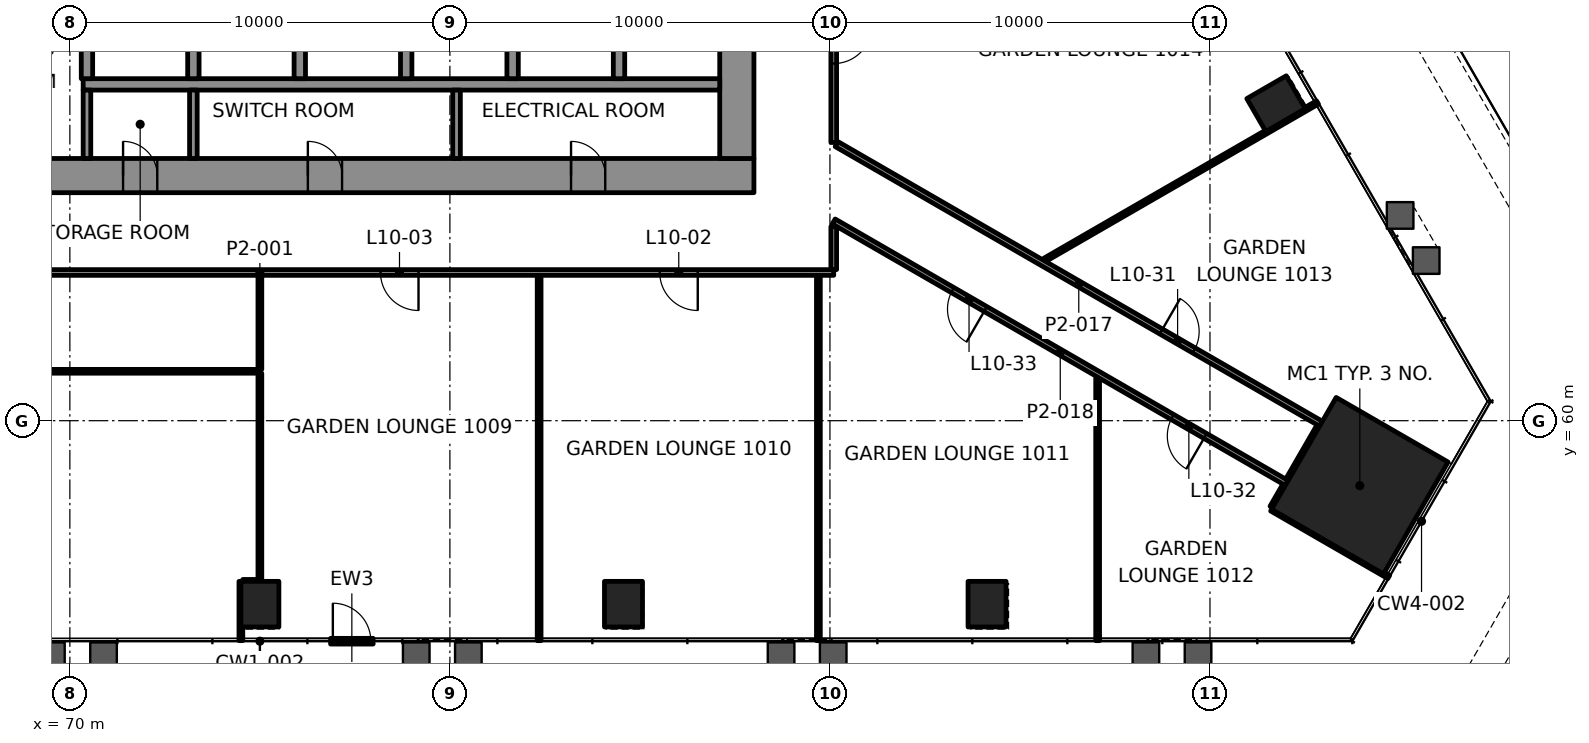
"""IFC4 building model, lengths in metres.
Left out: names, types, materials, properties, quantities, classifications, styles, units other than length and angle.
Written with IfcOpenShell. Run it as: python <this file> out.ifc"""

import sys

from ifc_helpers import new_model, si_unit, direction, frame, frame_2d, origin, origin_2d, place, context, subcontext, project, spatial, rectangle, extrude, element, fill, save


model = new_model("IFC4")
c1 = context("Model", 3, precision=1e-05, world=origin(), true_north=direction((0.0, 1.0)))
c2 = subcontext(c1, "Body", "Model", "MODEL_VIEW")
j1 = project(units=[si_unit("LENGTHUNIT", "METRE"), si_unit("PLANEANGLEUNIT", "RADIAN")], contexts=[c1])
p1 = place(None, origin())
s1 = spatial("IfcSite", under=j1, at=p1, CompositionType="ELEMENT")
p2 = place(p1, origin())
s2 = spatial("IfcBuilding", under=s1, at=p2, CompositionType="ELEMENT")
p3 = place(p2, frame((0.0, 0.0, 48.4)))
s3 = spatial("IfcBuildingStorey", under=s2, at=p3, CompositionType="ELEMENT", Elevation=48.4)
p4 = place(p3, frame((103.943, 58.29, 0.0), z_axis=(0.0, 0.0, 1.0), x_axis=(0.5, 0.866025403784, 0.0)))
e1 = element("IfcColumn", 1, at=p4, inside=s3, PredefinedType="COLUMN", context=c2, shape_type="SweptSolid", body=[
    extrude(rectangle(XDim=3.4, YDim=3.4, at=origin_2d()), origin(), (0.0, 0.0, 1.0), 4.2),
])
for number, where, z_axis, x_axis in (
    (2, (75.0, 55.172, -0.0), (0.0, 0.0, 1.0), (1.0, 0.0, 0.0)),
    (3, (84.567, 55.172, -0.0), (0.0, 0.0, 1.0), (1.0, 0.0, 0.0)),
    (4, (94.135, 55.172, -0.0), (0.0, 0.0, 1.0), (1.0, 0.0, 0.0)),
    (5, (101.739, 68.343, -0.0), (0.0, 0.0, 1.0), (-0.5, 0.866, 0.0)),
):
    element("IfcColumn", number, at=place(p3, frame(where, z_axis=z_axis, x_axis=x_axis)), inside=s3, PredefinedType="COLUMN", context=c2, shape_type="SweptSolid", body=[
        extrude(rectangle(XDim=1.0, YDim=1.2, at=origin_2d()), origin(), (0.0, 0.0, 1.0), 4.2),
    ])
p5 = place(p3, frame((62.0, 66.45, 0.0), z_axis=(0.0, 0.0, 1.0), x_axis=(1.0, 0.0, 0.0)))
e6 = element("IfcWall", 6, at=p5, inside=s3, PredefinedType="SHEAR", context=c2, shape_type="SweptSolid", body=[
    extrude(rectangle(XDim=26.0, YDim=0.9, at=frame_2d((13.0, 0.0))), origin(), (0.0, 0.0, 1.0), 4.0),
])
p6 = place(p5, frame((3.45, 0.0, 0.0)))
e7 = element("IfcOpeningElement", 7, at=p6, cuts=e6, PredefinedType="OPENING", context=c2, shape_type="SweptSolid", body=[
    extrude(rectangle(XDim=0.9, YDim=2.1, at=frame_2d((0.45, 1.05))), frame((0.0, 0.46, 0.0), z_axis=(0.0, -1.0, 0.0), x_axis=(1.0, 0.0, 0.0)), (0.0, 0.0, 1.0), 0.92),
])
p7 = place(p5, frame((6.425, 0.0, 0.0)))
e8 = element("IfcOpeningElement", 8, at=p7, cuts=e6, PredefinedType="OPENING", context=c2, shape_type="SweptSolid", body=[
    extrude(rectangle(XDim=0.9, YDim=2.1, at=frame_2d((0.45, 1.05))), frame((0.0, 0.46, 0.0), z_axis=(0.0, -1.0, 0.0), x_axis=(1.0, 0.0, 0.0)), (0.0, 0.0, 1.0), 0.92),
])
p8 = place(p5, frame((9.4, 0.0, 0.0)))
e9 = element("IfcOpeningElement", 9, at=p8, cuts=e6, PredefinedType="OPENING", context=c2, shape_type="SweptSolid", body=[
    extrude(rectangle(XDim=0.9, YDim=2.1, at=frame_2d((0.45, 1.05))), frame((0.0, 0.46, 0.0), z_axis=(0.0, -1.0, 0.0), x_axis=(1.0, 0.0, 0.0)), (0.0, 0.0, 1.0), 0.92),
])
p9 = place(p5, frame((14.262, 0.0, 0.0)))
e10 = element("IfcOpeningElement", 10, at=p9, cuts=e6, PredefinedType="OPENING", context=c2, shape_type="SweptSolid", body=[
    extrude(rectangle(XDim=0.9, YDim=2.1, at=frame_2d((0.45, 1.05))), frame((0.0, 0.46, 0.0), z_axis=(0.0, -1.0, 0.0), x_axis=(1.0, 0.0, 0.0)), (0.0, 0.0, 1.0), 0.92),
])
p10 = place(p5, frame((21.188, 0.0, 0.0)))
e11 = element("IfcOpeningElement", 11, at=p10, cuts=e6, PredefinedType="OPENING", context=c2, shape_type="SweptSolid", body=[
    extrude(rectangle(XDim=0.9, YDim=2.1, at=frame_2d((0.45, 1.05))), frame((0.0, 0.46, 0.0), z_axis=(0.0, -1.0, 0.0), x_axis=(1.0, 0.0, 0.0)), (0.0, 0.0, 1.0), 0.92),
])
p11 = place(p3, frame((87.55, 66.9, 0.0), z_axis=(0.0, 0.0, 1.0), x_axis=(0.0, 1.0, 0.0)))
e12 = element("IfcWall", 12, at=p11, inside=s3, PredefinedType="SHEAR", context=c2, shape_type="SweptSolid", body=[
    extrude(rectangle(XDim=16.2, YDim=0.9, at=frame_2d((8.1, 0.0))), origin(), (0.0, 0.0, 1.0), 4.0),
])
p12 = place(p11, frame((5.5, 0.0, 0.0)))
e13 = element("IfcOpeningElement", 13, at=p12, cuts=e12, PredefinedType="OPENING", context=c2, shape_type="SweptSolid", body=[
    extrude(rectangle(XDim=1.8, YDim=2.1, at=frame_2d((0.9, 1.05))), frame((0.0, 0.46, 0.0), z_axis=(0.0, -1.0, 0.0), x_axis=(1.0, 0.0, 0.0)), (0.0, 0.0, 1.0), 0.92),
])
p13 = place(p11, frame((11.738, 0.0, 0.0)))
e14 = element("IfcOpeningElement", 14, at=p13, cuts=e12, PredefinedType="OPENING", context=c2, shape_type="SweptSolid", body=[
    extrude(rectangle(XDim=0.9, YDim=2.1, at=frame_2d((0.45, 1.05))), frame((0.0, 0.46, 0.0), z_axis=(0.0, -1.0, 0.0), x_axis=(1.0, 0.0, 0.0)), (0.0, 0.0, 1.0), 0.92),
])
p14 = place(p3, frame((70.35, 68.85, 0.0), z_axis=(0.0, 0.0, 1.0), x_axis=(1.0, 0.0, 0.0)))
e15 = element("IfcWall", 15, at=p14, inside=s3, PredefinedType="SHEAR", context=c2, shape_type="SweptSolid", body=[
    extrude(rectangle(XDim=16.75, YDim=0.3, at=frame_2d((8.375, 0.0))), origin(), (0.0, 0.0, 1.0), 4.0),
])
for number, where, z_axis, x_axis in (
    (16, (70.45, 69.0, 0.0), (0.0, 0.0, 1.0), (0.0, 1.0, 0.0)),
    (17, (73.25, 69.0, 0.0), (0.0, 0.0, 1.0), (0.0, 1.0, 0.0)),
    (18, (76.05, 69.0, 0.0), (0.0, 0.0, 1.0), (0.0, 1.0, 0.0)),
    (19, (78.85, 69.0, 0.0), (0.0, 0.0, 1.0), (0.0, 1.0, 0.0)),
    (20, (81.65, 69.0, 0.0), (0.0, 0.0, 1.0), (0.0, 1.0, 0.0)),
    (21, (84.45, 69.0, 0.0), (0.0, 0.0, 1.0), (0.0, 1.0, 0.0)),
):
    element("IfcWall", number, at=place(p3, frame(where, z_axis=z_axis, x_axis=x_axis)), inside=s3, PredefinedType="SHEAR", context=c2, shape_type="SweptSolid", body=[
        extrude(rectangle(XDim=2.6, YDim=0.3, at=frame_2d((1.3, 0.0))), origin(), (0.0, 0.0, 1.0), 4.0),
    ])
p15 = place(p3, frame((74.551, 55.772, 0.0), z_axis=(0.0, 0.0, 1.0), x_axis=(1.0, 0.0, 0.0)))
e22 = element("IfcWall", 22, at=p15, inside=s3, PredefinedType="PARTITIONING", context=c2, shape_type="SweptSolid", body=[
    extrude(rectangle(XDim=0.399, YDim=0.1, at=frame_2d((0.199, 0.0))), origin(), (0.0, 0.0, 1.0), 3.4),
])
p16 = place(p3, frame((58.271, 61.3, 0.0), z_axis=(0.0, 0.0, 1.0), x_axis=(1.0, 0.0, 0.0)))
e23 = element("IfcWall", 23, at=p16, inside=s3, PredefinedType="PARTITIONING", context=c2, shape_type="SweptSolid", body=[
    extrude(rectangle(XDim=16.729, YDim=0.1, at=frame_2d((8.365, 0.0))), origin(), (0.0, 0.0, 1.0), 3.4),
])
p17 = place(p16, frame((7.865, 0.0, 0.0)))
e24 = element("IfcOpeningElement", 24, at=p17, cuts=e23, PredefinedType="OPENING", context=c2, shape_type="SweptSolid", body=[
    extrude(rectangle(XDim=1.0, YDim=2.1, at=frame_2d((0.5, 1.05))), frame((0.0, 0.06, 0.0), z_axis=(0.0, -1.0, 0.0), x_axis=(1.0, 0.0, 0.0)), (0.0, 0.0, 1.0), 0.12),
])
p18 = place(p3, frame((90.1, 63.9, 0.0), z_axis=(0.0, 0.0, 1.0), x_axis=(-1.0, 0.0, 0.0)))
e25 = element("IfcWall", 25, at=p18, inside=s3, PredefinedType="PARTITIONING", context=c2, shape_type="SweptSolid", body=[
    extrude(rectangle(XDim=30.2, YDim=0.15, at=frame_2d((15.1, 0.0))), origin(), (0.0, 0.0, 1.0), 3.4),
])
p19 = place(p18, frame((3.578, 0.0, 0.0)))
e26 = element("IfcOpeningElement", 26, at=p19, cuts=e25, PredefinedType="OPENING", context=c2, shape_type="SweptSolid", body=[
    extrude(rectangle(XDim=1.0, YDim=2.1, at=frame_2d((0.5, 1.05))), frame((0.0, 0.085, 0.0), z_axis=(0.0, -1.0, 0.0), x_axis=(1.0, 0.0, 0.0)), (0.0, 0.0, 1.0), 0.17),
])
p20 = place(p18, frame((10.926, 0.0, 0.0)))
e27 = element("IfcOpeningElement", 27, at=p20, cuts=e25, PredefinedType="OPENING", context=c2, shape_type="SweptSolid", body=[
    extrude(rectangle(XDim=1.0, YDim=2.1, at=frame_2d((0.5, 1.05))), frame((0.0, 0.085, 0.0), z_axis=(0.0, -1.0, 0.0), x_axis=(1.0, 0.0, 0.0)), (0.0, 0.0, 1.0), 0.17),
])
p21 = place(p18, frame((22.048, 0.0, 0.0)))
e28 = element("IfcOpeningElement", 28, at=p21, cuts=e25, PredefinedType="OPENING", context=c2, shape_type="SweptSolid", body=[
    extrude(rectangle(XDim=1.0, YDim=2.1, at=frame_2d((0.5, 1.05))), frame((0.0, 0.085, 0.0), z_axis=(0.0, -1.0, 0.0), x_axis=(1.0, 0.0, 0.0)), (0.0, 0.0, 1.0), 0.17),
])
p22 = place(p3, frame((95.653, 64.232, 0.0), z_axis=(0.0, 0.0, 1.0), x_axis=(0.866031516549, 0.499989412232, 0.0)))
e29 = element("IfcWall", 29, at=p22, inside=s3, PredefinedType="PARTITIONING", context=c2, shape_type="SweptSolid", body=[
    extrude(rectangle(XDim=8.286, YDim=0.1, at=frame_2d((4.143, 0.0))), origin(), (0.0, 0.0, 1.0), 3.4),
])
p23 = place(p3, frame((101.646, 57.711, 0.0), z_axis=(0.0, 0.0, 1.0), x_axis=(0.499837337514, 0.866119296648, 0.0)))
e30 = element("IfcWall", 30, at=p23, inside=s3, PredefinedType="PARTITIONING", context=c2, shape_type="SweptSolid", body=[
    extrude(rectangle(XDim=0.675, YDim=0.15, at=frame_2d((0.337, 0.0))), origin(), (0.0, 0.0, 1.0), 3.4),
])
p24 = place(p3, frame((97.044, 54.212, 0.0), z_axis=(0.0, 0.0, 1.0), x_axis=(0.0, 1.0, 0.0)))
e31 = element("IfcWall", 31, at=p24, inside=s3, PredefinedType="PARTITIONING", context=c2, shape_type="SweptSolid", body=[
    extrude(rectangle(XDim=6.905, YDim=0.1, at=frame_2d((3.453, 0.0))), origin(), (0.0, 0.0, 1.0), 3.4),
])
p25 = place(p3, frame((90.1, 63.976, 0.0), z_axis=(0.0, 0.0, 1.0), x_axis=(0.0, 1.0, 0.0)))
e32 = element("IfcWall", 32, at=p25, inside=s3, PredefinedType="PARTITIONING", context=c2, shape_type="SweptSolid", body=[
    extrude(rectangle(XDim=1.131, YDim=0.15, at=frame_2d((0.565, 0.0))), origin(), (0.0, 0.0, 1.0), 3.247),
])
p26 = place(p3, frame((90.1, 86.1, 0.0), z_axis=(0.0, 0.0, 1.0), x_axis=(0.0, -1.0, 0.0)))
e33 = element("IfcWall", 33, at=p26, inside=s3, PredefinedType="PARTITIONING", context=c2, shape_type="SweptSolid", body=[
    extrude(rectangle(XDim=18.778, YDim=0.15, at=frame_2d((9.389, 0.0))), origin(), (0.0, 0.0, 1.0), 3.4),
])
p27 = place(p26, frame((7.704, 0.0, 0.0)))
e34 = element("IfcOpeningElement", 34, at=p27, cuts=e33, PredefinedType="OPENING", context=c2, shape_type="SweptSolid", body=[
    extrude(rectangle(XDim=1.0, YDim=2.1, at=frame_2d((0.5, 1.05))), frame((0.0, 0.085, 0.0), z_axis=(0.0, -1.0, 0.0), x_axis=(1.0, 0.0, 0.0)), (0.0, 0.0, 1.0), 0.17),
])
p28 = place(p26, frame((15.701, 0.0, 0.0)))
e35 = element("IfcOpeningElement", 35, at=p28, cuts=e33, PredefinedType="OPENING", context=c2, shape_type="SweptSolid", body=[
    extrude(rectangle(XDim=1.0, YDim=2.1, at=frame_2d((0.5, 1.05))), frame((0.0, 0.085, 0.0), z_axis=(0.0, -1.0, 0.0), x_axis=(1.0, 0.0, 0.0)), (0.0, 0.0, 1.0), 0.17),
])
for number, where, z_axis, x_axis in (
    (36, (89.696, 54.212, 0.0), (0.0, 0.0, 1.0), (0.0, 1.0, 0.0)),
    (37, (82.348, 54.212, 0.0), (0.0, 0.0, 1.0), (0.0, 1.0, 0.0)),
):
    element("IfcWall", number, at=place(p3, frame(where, z_axis=z_axis, x_axis=x_axis)), inside=s3, PredefinedType="PARTITIONING", context=c2, shape_type="SweptSolid", body=[
        extrude(rectangle(XDim=9.613, YDim=0.1, at=frame_2d((4.806, 0.0))), origin(), (0.0, 0.0, 1.0), 3.165),
    ])
p29 = place(p3, frame((75.0, 55.773, 0.0), z_axis=(0.0, 0.0, 1.0), x_axis=(0.0, 1.0, 0.0)))
e38 = element("IfcWall", 38, at=p29, inside=s3, PredefinedType="PARTITIONING", context=c2, shape_type="SweptSolid", body=[
    extrude(rectangle(XDim=5.477, YDim=0.1, at=frame_2d((2.739, 0.0))), origin(), (0.0, 0.0, 1.0), 3.4),
])
p30 = place(p3, frame((74.5, 54.212, 0.0), z_axis=(0.0, 0.0, 1.0), x_axis=(0.0, 1.0, 0.0)))
e39 = element("IfcWall", 39, at=p30, inside=s3, PredefinedType="PARTITIONING", context=c2, shape_type="SweptSolid", body=[
    extrude(rectangle(XDim=1.56, YDim=0.1, at=frame_2d((0.78, 0.0))), origin(), (0.0, 0.0, 1.0), 3.165),
])
p31 = place(p3, frame((90.175, 67.278, 0.0), z_axis=(0.0, 0.0, 1.0), x_axis=(0.866025356753, -0.50000008146, 0.0)))
e40 = element("IfcWall", 40, at=p31, inside=s3, PredefinedType="PARTITIONING", context=c2, shape_type="SweptSolid", body=[
    extrude(rectangle(XDim=14.717, YDim=0.15, at=frame_2d((7.358, 0.0))), origin(), (0.0, 0.0, 1.0), 3.4),
])
p32 = place(p31, frame((9.861, 0.0, 0.0)))
e41 = element("IfcOpeningElement", 41, at=p32, cuts=e40, PredefinedType="OPENING", context=c2, shape_type="SweptSolid", body=[
    extrude(rectangle(XDim=1.0, YDim=2.1, at=frame_2d((0.5, 1.05))), frame((0.0, 0.085, 0.0), z_axis=(0.0, -1.0, 0.0), x_axis=(1.0, 0.0, 0.0)), (0.0, 0.0, 1.0), 0.17),
])
p33 = place(p3, frame((102.021, 58.361, 0.0), z_axis=(0.0, 0.0, 1.0), x_axis=(-0.866027566471, 0.499996254098, 0.0)))
e42 = element("IfcWall", 42, at=p33, inside=s3, PredefinedType="PARTITIONING", context=c2, shape_type="SweptSolid", body=[
    extrude(rectangle(XDim=13.765, YDim=0.15, at=frame_2d((6.882, 0.0))), origin(), (0.0, 0.0, 1.0), 3.247),
])
p34 = place(p33, frame((2.475, 0.0, 0.0)))
e43 = element("IfcOpeningElement", 43, at=p34, cuts=e42, PredefinedType="OPENING", context=c2, shape_type="SweptSolid", body=[
    extrude(rectangle(XDim=1.0, YDim=2.1, at=frame_2d((0.5, 1.05))), frame((0.0, 0.085, 0.0), z_axis=(0.0, -1.0, 0.0), x_axis=(1.0, 0.0, 0.0)), (0.0, 0.0, 1.0), 0.17),
])
p35 = place(p33, frame((9.154, 0.0, 0.0)))
e44 = element("IfcOpeningElement", 44, at=p35, cuts=e42, PredefinedType="OPENING", context=c2, shape_type="SweptSolid", body=[
    extrude(rectangle(XDim=1.0, YDim=2.1, at=frame_2d((0.5, 1.05))), frame((0.0, 0.085, 0.0), z_axis=(0.0, -1.0, 0.0), x_axis=(1.0, 0.0, 0.0)), (0.0, 0.0, 1.0), 0.17),
])
p36 = place(p3, frame((104.704, 55.888, 0.0), z_axis=(0.0, 0.0, 1.0), x_axis=(-0.866014251095, 0.500019316528, 0.0)))
e45 = element("IfcWall", 45, at=p36, inside=s3, PredefinedType="PARTITIONING", context=c2, shape_type="SweptSolid", body=[
    extrude(rectangle(XDim=3.559, YDim=0.1, at=frame_2d((1.78, 0.0))), origin(), (0.0, 0.0, 1.0), 3.4),
])
p37 = place(p3, frame((75.0, 61.35, 0.0), z_axis=(0.0, 0.0, 1.0), x_axis=(0.0, 1.0, 0.0)))
e46 = element("IfcWall", 46, at=p37, inside=s3, PredefinedType="PARTITIONING", context=c2, shape_type="SweptSolid", body=[
    extrude(rectangle(XDim=2.475, YDim=0.1, at=frame_2d((1.237, 0.0))), origin(), (0.0, 0.0, 1.0), 3.4),
])
p38 = place(p3, frame((102.058, 58.426, 0.0), z_axis=(0.0, 0.0, 1.0), x_axis=(0.499991515992, 0.866030301974, 0.0)))
e47 = element("IfcWall", 47, at=p38, inside=s3, PredefinedType="PARTITIONING", context=c2, shape_type="SweptSolid", body=[
    extrude(rectangle(XDim=1.649, YDim=0.15, at=frame_2d((0.825, 0.0))), origin(), (0.0, 0.0, 1.0), 3.247),
])
p39 = place(p3, frame((105.985, 51.327, 0.0), z_axis=(0.0, 0.0, 1.0), x_axis=(0.49999175339, 0.866030164915, 0.0)))
e48 = element("IfcWall", 48, at=p39, inside=s3, PredefinedType="SOLIDWALL", context=c2, shape_type="SweptSolid", body=[
    extrude(rectangle(XDim=10.019, YDim=0.8, at=frame_2d((5.009, 0.0))), origin(), (0.0, 0.0, 1.0), 0.9),
])
p40 = place(p3, frame((110.994, 61.012, 0.0), z_axis=(0.0, 0.0, 1.0), x_axis=(-0.500000104629, 0.866025343377, 0.0)))
e49 = element("IfcWall", 49, at=p40, inside=s3, PredefinedType="SOLIDWALL", context=c2, shape_type="SweptSolid", body=[
    extrude(rectangle(XDim=41.178, YDim=0.8, at=frame_2d((20.589, 0.0))), origin(), (0.0, 0.0, 1.0), 0.9),
])
for number, where, z_axis, x_axis in (
    (50, (70.45, 66.9, 0.0), (0.0, 0.0, 1.0), (0.0, 1.0, 0.0)),
    (51, (73.25, 66.9, 0.0), (0.0, 0.0, 1.0), (0.0, 1.0, 0.0)),
    (52, (80.175, 66.9, 0.0), (0.0, 0.0, 1.0), (0.0, 1.0, 0.0)),
):
    element("IfcWall", number, at=place(p3, frame(where, z_axis=z_axis, x_axis=x_axis)), inside=s3, PredefinedType="PARTITIONING", context=c2, shape_type="SweptSolid", body=[
        extrude(rectangle(XDim=1.8, YDim=0.2, at=frame_2d((0.9, 0.0))), origin(), (0.0, 0.0, 1.0), 4.0),
    ])
p41 = place(p19, origin())
e53 = element("IfcDoor", 53, at=p41, inside=s3, OperationType="SINGLE_SWING_RIGHT", PredefinedType="DOOR", context=c2, shape_type="SweptSolid", body=[
    extrude(rectangle(XDim=1.0, YDim=2.1, at=frame_2d((0.5, 1.05))), frame((0.0, 0.025, 0.0), z_axis=(0.0, -1.0, 0.0), x_axis=(1.0, 0.0, 0.0)), (0.0, 0.0, 1.0), 0.05),
])
fill(e26, e53)
p42 = place(p20, origin())
e54 = element("IfcDoor", 54, at=p42, inside=s3, OperationType="SINGLE_SWING_LEFT", PredefinedType="DOOR", context=c2, shape_type="SweptSolid", body=[
    extrude(rectangle(XDim=1.0, YDim=2.1, at=frame_2d((0.5, 1.05))), frame((0.0, 0.025, 0.0), z_axis=(0.0, -1.0, 0.0), x_axis=(1.0, 0.0, 0.0)), (0.0, 0.0, 1.0), 0.05),
])
fill(e27, e54)
p43 = place(p28, origin())
e55 = element("IfcDoor", 55, at=p43, inside=s3, OperationType="SINGLE_SWING_RIGHT", PredefinedType="DOOR", context=c2, shape_type="SweptSolid", body=[
    extrude(rectangle(XDim=1.0, YDim=2.1, at=frame_2d((0.5, 1.05))), frame((0.0, 0.025, 0.0), z_axis=(0.0, -1.0, 0.0), x_axis=(1.0, 0.0, 0.0)), (0.0, 0.0, 1.0), 0.05),
])
fill(e35, e55)
p44 = place(p32, origin())
e56 = element("IfcDoor", 56, at=p44, inside=s3, OperationType="SINGLE_SWING_LEFT", PredefinedType="DOOR", context=c2, shape_type="SweptSolid", body=[
    extrude(rectangle(XDim=1.0, YDim=2.1, at=frame_2d((0.5, 1.05))), frame((0.0, 0.025, 0.0), z_axis=(0.0, -1.0, 0.0), x_axis=(1.0, 0.0, 0.0)), (0.0, 0.0, 1.0), 0.05),
])
fill(e41, e56)
p45 = place(p34, origin())
e57 = element("IfcDoor", 57, at=p45, inside=s3, OperationType="SINGLE_SWING_LEFT", PredefinedType="DOOR", context=c2, shape_type="SweptSolid", body=[
    extrude(rectangle(XDim=1.0, YDim=2.1, at=frame_2d((0.5, 1.05))), frame((0.0, 0.025, 0.0), z_axis=(0.0, -1.0, 0.0), x_axis=(1.0, 0.0, 0.0)), (0.0, 0.0, 1.0), 0.05),
])
fill(e43, e57)
p46 = place(p35, origin())
e58 = element("IfcDoor", 58, at=p46, inside=s3, OperationType="SINGLE_SWING_RIGHT", PredefinedType="DOOR", context=c2, shape_type="SweptSolid", body=[
    extrude(rectangle(XDim=1.0, YDim=2.1, at=frame_2d((0.5, 1.05))), frame((0.0, 0.025, 0.0), z_axis=(0.0, -1.0, 0.0), x_axis=(1.0, 0.0, 0.0)), (0.0, 0.0, 1.0), 0.05),
])
fill(e44, e58)
p47 = place(p3, frame((76.86, 54.197, 0.0), z_axis=(0.0, 0.0, 1.0), x_axis=(1.0, 0.0, 0.0)))
p48 = place(p47, frame((0.06, 0.0, 0.0)))
p49 = place(p48, origin())
e59 = element("IfcDoor", 59, at=p49, inside=s3, OperationType="SINGLE_SWING_LEFT", PredefinedType="DOOR", context=c2, shape_type="SweptSolid", body=[
    extrude(rectangle(XDim=1.0, YDim=2.1, at=frame_2d((0.5, 1.05))), frame((0.0, 0.025, 0.0), z_axis=(0.0, -1.0, 0.0), x_axis=(1.0, 0.0, 0.0)), (0.0, 0.0, 1.0), 0.05),
])
p50 = place(p8, origin())
e60 = element("IfcDoor", 60, at=p50, inside=s3, OperationType="SINGLE_SWING_LEFT", PredefinedType="DOOR", context=c2, shape_type="SweptSolid", body=[
    extrude(rectangle(XDim=0.9, YDim=2.1, at=frame_2d((0.45, 1.05))), frame((0.0, 0.17, 0.0), z_axis=(0.0, -1.0, 0.0), x_axis=(1.0, 0.0, 0.0)), (0.0, 0.0, 1.0), 0.34),
])
fill(e9, e60)
p51 = place(p9, origin())
e61 = element("IfcDoor", 61, at=p51, inside=s3, OperationType="SINGLE_SWING_RIGHT", PredefinedType="DOOR", context=c2, shape_type="SweptSolid", body=[
    extrude(rectangle(XDim=0.9, YDim=2.1, at=frame_2d((0.45, 1.05))), frame((0.0, 0.17, 0.0), z_axis=(0.0, -1.0, 0.0), x_axis=(1.0, 0.0, 0.0)), (0.0, 0.0, 1.0), 0.34),
])
fill(e10, e61)
p52 = place(p10, origin())
e62 = element("IfcDoor", 62, at=p52, inside=s3, OperationType="SINGLE_SWING_LEFT", PredefinedType="DOOR", context=c2, shape_type="SweptSolid", body=[
    extrude(rectangle(XDim=0.9, YDim=2.1, at=frame_2d((0.45, 1.05))), frame((0.0, 0.17, 0.0), z_axis=(0.0, -1.0, 0.0), x_axis=(1.0, 0.0, 0.0)), (0.0, 0.0, 1.0), 0.34),
])
fill(e11, e62)
save(model, sys.argv[1])
